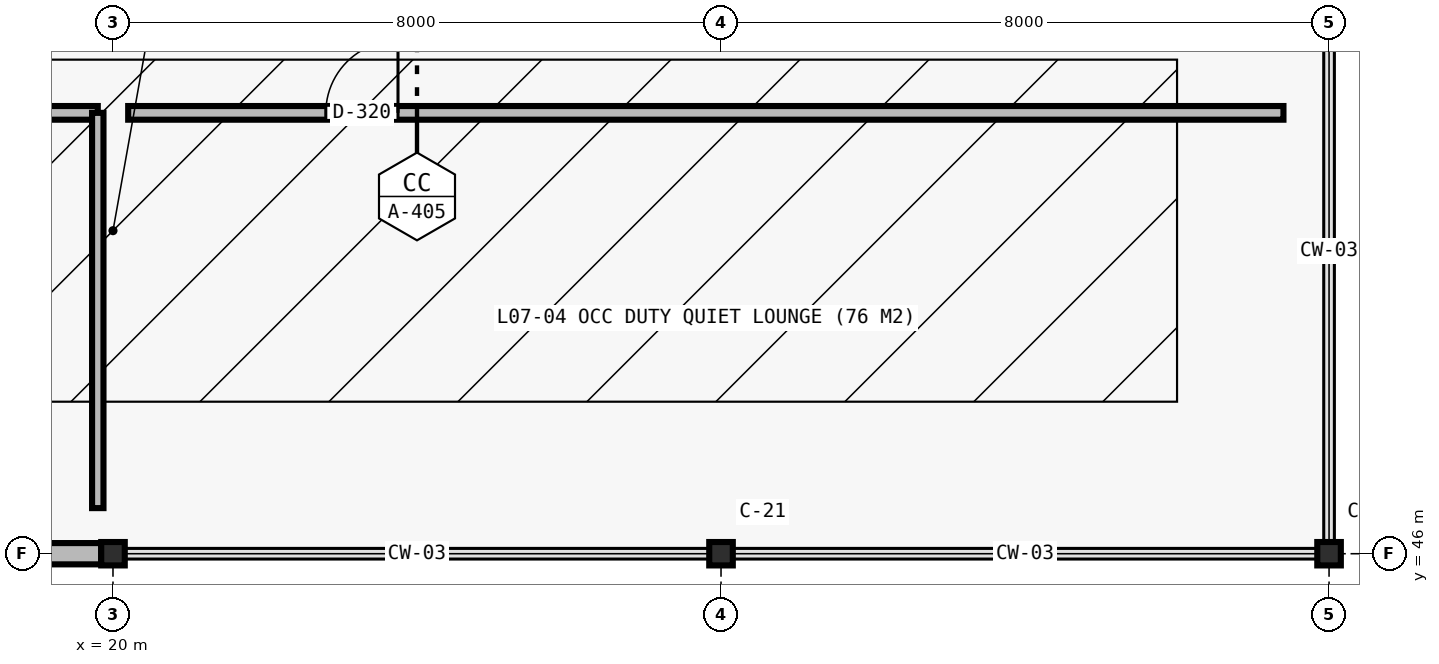
"""IFC4 building model, lengths in metres.
Left out: names, types, materials, properties, quantities, classifications, styles, units other than length and angle.
Written with IfcOpenShell. Run it as: python <this file> out.ifc"""

import sys

from ifc_helpers import new_model, si_unit, direction, frame, frame_2d, origin, origin_2d, place, context, subcontext, project, spatial, rectangle, i_section, extrude, element, fill, save


model = new_model("IFC4")
c1 = context("Model", 3, precision=1e-05, world=origin(), true_north=direction((0.0, 1.0)))
c2 = subcontext(c1, "Body", "Model", "MODEL_VIEW")
j1 = project(units=[si_unit("LENGTHUNIT", "METRE"), si_unit("PLANEANGLEUNIT", "RADIAN")], contexts=[c1])
p1 = place(None, origin())
s1 = spatial("IfcSite", under=j1, at=p1, CompositionType="ELEMENT")
p2 = place(p1, origin())
s2 = spatial("IfcBuilding", under=s1, at=p2, CompositionType="ELEMENT")
p3 = place(p2, frame((0.0, 0.0, 32.2)))
s3 = spatial("IfcBuildingStorey", under=s2, at=p3, CompositionType="ELEMENT", Elevation=32.2)
for number, where, z_axis, x_axis in (
    (1, (20.0, 46.0, 0.0), (0.0, 0.0, 1.0), (1.0, 0.0, 0.0)),
    (2, (28.0, 46.0, 0.0), (0.0, 0.0, 1.0), (1.0, 0.0, 0.0)),
    (3, (36.0, 46.0, 0.0), (0.0, 0.0, 1.0), (1.0, 0.0, 0.0)),
):
    element("IfcColumn", number, at=place(p3, frame(where, z_axis=z_axis, x_axis=x_axis)), inside=s3, PredefinedType="COLUMN", context=c2, shape_type="SweptSolid", body=[
        extrude(i_section(OverallWidth=0.31, OverallDepth=0.308, WebThickness=0.015, FlangeThickness=0.015, at=origin_2d()), origin(), (0.0, 0.0, 1.0), 3.96),
    ])
p4 = place(p3, frame((19.845, 46.0, 0.0), z_axis=(0.0, 0.0, 1.0), x_axis=(-1.0, 0.0, 0.0)))
e4 = element("IfcWall", 4, at=p4, inside=s3, PredefinedType="STANDARD", context=c2, shape_type="SweptSolid", body=[
    extrude(rectangle(XDim=7.69, YDim=0.28, at=frame_2d((3.845, 0.0))), origin(), (0.0, 0.0, 1.0), 3.55),
])
p5 = place(p4, frame((2.795, 0.0, 0.95)))
e5 = element("IfcOpeningElement", 5, at=p5, cuts=e4, PredefinedType="OPENING", context=c2, shape_type="SweptSolid", body=[
    extrude(rectangle(XDim=2.1, YDim=2.1, at=frame_2d((1.05, 1.05))), frame((0.0, 0.15, 0.0), z_axis=(0.0, -1.0, 0.0), x_axis=(1.0, 0.0, 0.0)), (0.0, 0.0, 1.0), 0.3),
])
p6 = place(p3, frame((6.4, 51.8, 0.0), z_axis=(0.0, 0.0, 1.0), x_axis=(1.0, 0.0, 0.0)))
e6 = element("IfcWall", 6, at=p6, inside=s3, PredefinedType="PARTITIONING", context=c2, shape_type="SweptSolid", body=[
    extrude(rectangle(XDim=13.4, YDim=0.18, at=frame_2d((6.7, 0.0))), origin(), (0.0, 0.0, 1.0), 3.96),
])
p7 = place(p6, frame((2.4, 0.0, 0.0)))
e7 = element("IfcOpeningElement", 7, at=p7, cuts=e6, PredefinedType="OPENING", context=c2, shape_type="SweptSolid", body=[
    extrude(rectangle(XDim=1.6, YDim=2.2, at=frame_2d((0.8, 1.1))), frame((0.0, 0.1, 0.0), z_axis=(0.0, -1.0, 0.0), x_axis=(1.0, 0.0, 0.0)), (0.0, 0.0, 1.0), 0.2),
])
p8 = place(p3, frame((19.8, 46.6, 0.0), z_axis=(0.0, 0.0, 1.0), x_axis=(0.0, 1.0, 0.0)))
e8 = element("IfcWall", 8, at=p8, inside=s3, PredefinedType="PARTITIONING", context=c2, shape_type="SweptSolid", body=[
    extrude(rectangle(XDim=5.2, YDim=0.15, at=frame_2d((2.6, 0.0))), origin(), (0.0, 0.0, 1.0), 3.96),
])
p9 = place(p3, frame((20.2, 51.8, 0.0), z_axis=(0.0, 0.0, 1.0), x_axis=(1.0, 0.0, 0.0)))
e9 = element("IfcWall", 9, at=p9, inside=s3, PredefinedType="PARTITIONING", context=c2, shape_type="SweptSolid", body=[
    extrude(rectangle(XDim=15.2, YDim=0.18, at=frame_2d((7.6, 0.0))), origin(), (0.0, 0.0, 1.0), 3.96),
])
p10 = place(p9, frame((2.6, 0.0, 0.0)))
e10 = element("IfcOpeningElement", 10, at=p10, cuts=e9, PredefinedType="OPENING", context=c2, shape_type="SweptSolid", body=[
    extrude(rectangle(XDim=0.95, YDim=2.1, at=frame_2d((0.475, 1.05))), frame((0.0, 0.1, 0.0), z_axis=(0.0, -1.0, 0.0), x_axis=(1.0, 0.0, 0.0)), (0.0, 0.0, 1.0), 0.2),
])
p11 = place(p10, origin())
e11 = element("IfcDoor", 11, at=p11, inside=s3, OperationType="SINGLE_SWING_RIGHT", PredefinedType="DOOR", context=c2, shape_type="SweptSolid", body=[
    extrude(rectangle(XDim=0.95, YDim=2.1, at=frame_2d((0.475, 1.05))), frame((0.0, 0.025, 0.0), z_axis=(0.0, -1.0, 0.0), x_axis=(1.0, 0.0, 0.0)), (0.0, 0.0, 1.0), 0.05),
])
fill(e10, e11)
save(model, sys.argv[1])
